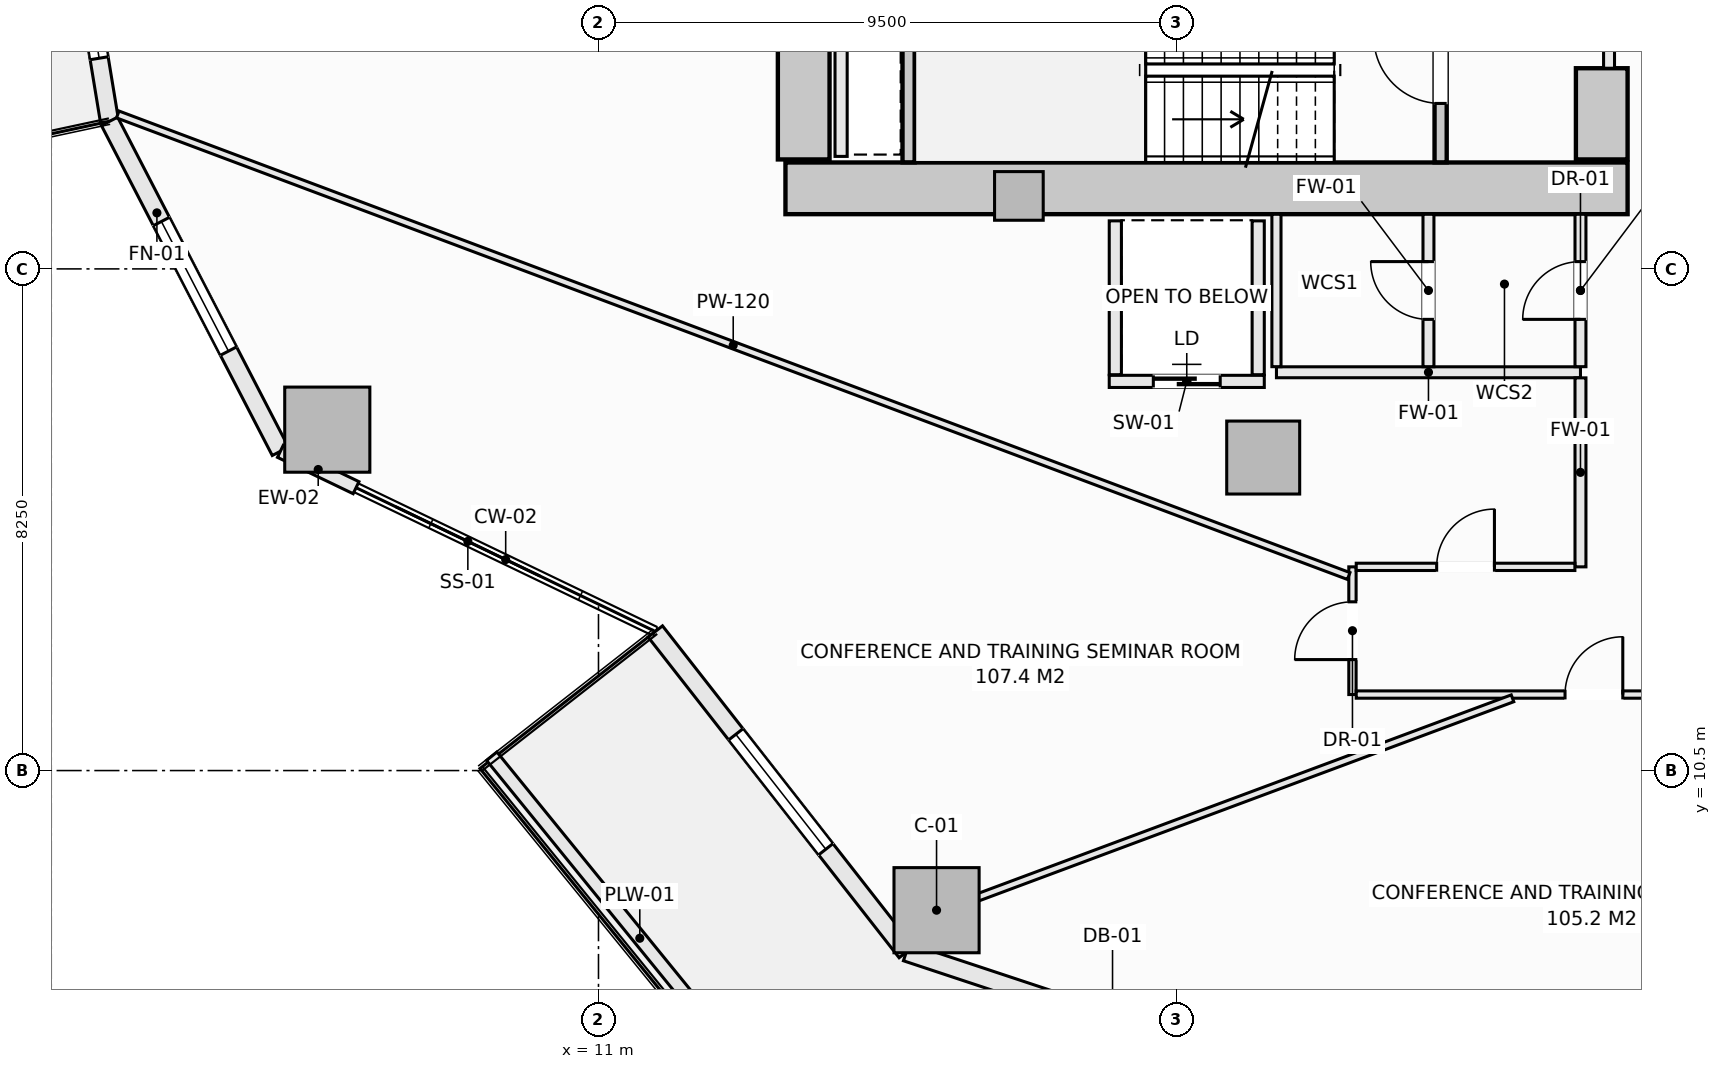
"""IFC4 building model, lengths in metres.
Left out: names, types, materials, properties, quantities, classifications, styles, units other than length and angle.
Written with IfcOpenShell. Run it as: python <this file> out.ifc"""

import sys

from ifc_helpers import new_model, si_unit, direction, frame, frame_2d, origin, origin_2d, place, context, subcontext, project, spatial, rectangle, extrude, element, fill, save


model = new_model("IFC4")
c1 = context("Model", 3, precision=1e-05, world=origin(), true_north=direction((0.0, 1.0)))
c2 = subcontext(c1, "Body", "Model", "MODEL_VIEW")
j1 = project(units=[si_unit("LENGTHUNIT", "METRE"), si_unit("PLANEANGLEUNIT", "RADIAN")], contexts=[c1])
p1 = place(None, origin())
s1 = spatial("IfcSite", under=j1, at=p1, CompositionType="ELEMENT")
p2 = place(p1, origin())
s2 = spatial("IfcBuilding", under=s1, at=p2, CompositionType="ELEMENT")
p3 = place(p2, frame((0.0, 0.0, 38.05)))
s3 = spatial("IfcBuildingStorey", under=s2, at=p3, CompositionType="ELEMENT", Elevation=38.05)
p4 = place(p3, frame((14.075, 20.075, -0.28), z_axis=(0.0, 0.0, 1.0), x_axis=(1.0, 0.0, 0.0)))
e1 = element("IfcWall", 1, at=p4, inside=s3, PredefinedType="SHEAR", context=c2, shape_type="SweptSolid", body=[
    extrude(rectangle(XDim=13.85, YDim=0.85, at=frame_2d((6.925, 0.0))), origin(), (0.0, 0.0, 1.0), 3.85),
])
p5 = place(p3, frame((14.375, 20.55, -0.28), z_axis=(0.0, 0.0, 1.0), x_axis=(0.0, 1.0, 0.0)))
e2 = element("IfcWall", 2, at=p5, inside=s3, PredefinedType="SHEAR", context=c2, shape_type="SweptSolid", body=[
    extrude(rectangle(XDim=12.9, YDim=0.85, at=frame_2d((6.45, 0.0))), origin(), (0.0, 0.0, 1.0), 3.85),
])
p6 = place(p3, frame((27.5, 20.55, -0.28), z_axis=(0.0, 0.0, 1.0), x_axis=(0.0, 1.0, 0.0)))
e3 = element("IfcWall", 3, at=p6, inside=s3, PredefinedType="SHEAR", context=c2, shape_type="SweptSolid", body=[
    extrude(rectangle(XDim=1.5, YDim=0.85, at=frame_2d((0.75, 0.0))), origin(), (0.0, 0.0, 1.0), 3.85),
])
for number, where, z_axis, x_axis in (
    (4, (6.54, 16.106, -0.28), (0.0, 0.0, 1.0), (1.0, 0.0, 0.0)),
    (5, (16.56, 8.204, -0.28), (0.0, 0.0, 1.0), (1.0, 0.0, 0.0)),
):
    element("IfcColumn", number, at=place(p3, frame(where, z_axis=z_axis, x_axis=x_axis)), inside=s3, PredefinedType="COLUMN", context=c2, shape_type="SweptSolid", body=[
        extrude(rectangle(XDim=1.4, YDim=1.4, at=origin_2d()), origin(), (0.0, 0.0, 1.0), 3.85),
    ])
p7 = place(p3, frame((21.932, 15.648, -0.28), z_axis=(0.0, 0.0, 1.0), x_axis=(1.0, 0.0, 0.0)))
e6 = element("IfcColumn", 6, at=p7, inside=s3, PredefinedType="COLUMN", context=c2, shape_type="SweptSolid", body=[
    extrude(rectangle(XDim=1.2, YDim=1.2, at=origin_2d()), origin(), (0.0, 0.0, 1.0), 3.85),
])
p8 = place(p3, frame((17.914, 19.95, -0.28), z_axis=(0.0, 0.0, 1.0), x_axis=(1.0, 0.0, 0.0)))
e7 = element("IfcColumn", 7, at=p8, inside=s3, PredefinedType="PILASTER", context=c2, shape_type="SweptSolid", body=[
    extrude(rectangle(XDim=0.8, YDim=0.8, at=origin_2d()), origin(), (0.0, 0.0, 1.0), 3.85),
])
p9 = place(p3, frame((2.0, 27.0, 0.0), z_axis=(0.0, 0.0, 1.0), x_axis=(0.162366057843, -0.98673059305, 0.0)))
e8 = element("IfcWall", 8, at=p9, inside=s3, PredefinedType="SOLIDWALL", context=c2, shape_type="SweptSolid", body=[
    extrude(rectangle(XDim=5.902, YDim=0.3, at=frame_2d((2.951, 0.0))), origin(), (0.0, 0.0, 1.0), 3.093),
])
p10 = place(p9, frame((2.45, 0.0, 0.85)))
e9 = element("IfcOpeningElement", 9, at=p10, cuts=e8, PredefinedType="OPENING", context=c2, shape_type="SweptSolid", body=[
    extrude(rectangle(XDim=2.4, YDim=1.9, at=frame_2d((1.2, 0.95))), frame((0.0, 0.16, 0.0), z_axis=(0.0, -1.0, 0.0), x_axis=(1.0, 0.0, 0.0)), (0.0, 0.0, 1.0), 0.32),
])
p11 = place(p3, frame((2.958, 21.177, 0.0), z_axis=(0.0, 0.0, 1.0), x_axis=(0.459809804413, -0.88801742312, 0.0)))
e10 = element("IfcWall", 10, at=p11, inside=s3, PredefinedType="SOLIDWALL", context=c2, shape_type="SweptSolid", body=[
    extrude(rectangle(XDim=6.111, YDim=0.3, at=frame_2d((3.055, 0.0))), origin(), (0.0, 0.0, 1.0), 3.093),
])
p12 = place(p11, frame((1.855, 0.0, 0.85)))
e11 = element("IfcOpeningElement", 11, at=p12, cuts=e10, PredefinedType="OPENING", context=c2, shape_type="SweptSolid", body=[
    extrude(rectangle(XDim=2.4, YDim=1.9, at=frame_2d((1.2, 0.95))), frame((0.0, 0.16, 0.0), z_axis=(0.0, -1.0, 0.0), x_axis=(1.0, 0.0, 0.0)), (0.0, 0.0, 1.0), 0.32),
])
p13 = place(p3, frame((5.768, 15.75, 0.0), z_axis=(0.0, 0.0, 1.0), x_axis=(0.90131879969, -0.433156347438, 0.0)))
e12 = element("IfcWall", 12, at=p13, inside=s3, PredefinedType="SOLIDWALL", context=c2, shape_type="SweptSolid", body=[
    extrude(rectangle(XDim=1.381, YDim=0.22, at=frame_2d((0.69, 0.0))), origin(), (0.0, 0.0, 1.0), 3.093),
])
p14 = place(p3, frame((11.935, 12.787, 0.0), z_axis=(0.0, 0.0, 1.0), x_axis=(0.616421309777, -0.787416515482, 0.0)))
e13 = element("IfcWall", 13, at=p14, inside=s3, PredefinedType="SOLIDWALL", context=c2, shape_type="SweptSolid", body=[
    extrude(rectangle(XDim=6.696, YDim=0.3, at=frame_2d((3.348, 0.0))), origin(), (0.0, 0.0, 1.0), 3.093),
])
p15 = place(p14, frame((2.148, 0.0, 0.85)))
e14 = element("IfcOpeningElement", 14, at=p15, cuts=e13, PredefinedType="OPENING", context=c2, shape_type="SweptSolid", body=[
    extrude(rectangle(XDim=2.4, YDim=1.9, at=frame_2d((1.2, 0.95))), frame((0.0, 0.16, 0.0), z_axis=(0.0, -1.0, 0.0), x_axis=(1.0, 0.0, 0.0)), (0.0, 0.0, 1.0), 0.32),
])
p16 = place(p3, frame((16.062, 7.514, 0.0), z_axis=(0.0, 0.0, 1.0), x_axis=(0.949238715533, -0.31455661006, 0.0)))
e15 = element("IfcWall", 15, at=p16, inside=s3, PredefinedType="SOLIDWALL", context=c2, shape_type="SweptSolid", body=[
    extrude(rectangle(XDim=7.146, YDim=0.3, at=frame_2d((3.573, 0.0))), origin(), (0.0, 0.0, 1.0), 3.093),
])
p17 = place(p16, frame((2.673, 0.0, 0.0)))
e16 = element("IfcOpeningElement", 16, at=p17, cuts=e15, PredefinedType="OPENING", context=c2, shape_type="SweptSolid", body=[
    extrude(rectangle(XDim=1.8, YDim=2.25, at=frame_2d((0.9, 1.125))), frame((0.0, 0.16, 0.0), z_axis=(0.0, -1.0, 0.0), x_axis=(1.0, 0.0, 0.0)), (0.0, 0.0, 1.0), 0.32),
])
p18 = place(p3, frame((9.244, 10.736, 0.0), z_axis=(0.0, 0.0, 1.0), x_axis=(0.630997450658, -0.775784903993, 0.0)))
e17 = element("IfcWall", 17, at=p18, inside=s3, PredefinedType="PARAPET", context=c2, shape_type="SweptSolid", body=[
    extrude(rectangle(XDim=7.718, YDim=0.22, at=frame_2d((3.859, 0.0))), origin(), (0.0, 0.0, 1.0), 0.52),
])
p19 = place(p3, frame((24.85, 20.502, -0.28), z_axis=(0.0, 0.0, 1.0), x_axis=(0.0, 1.0, 0.0)))
e18 = element("IfcWall", 18, at=p19, inside=s3, PredefinedType="SHEAR", context=c2, shape_type="SweptSolid", body=[
    extrude(rectangle(XDim=3.038, YDim=0.2, at=frame_2d((1.519, 0.0))), origin(), (0.0, 0.0, 1.0), 3.85),
])
p20 = place(p19, frame((0.969, 0.0, 0.28)))
e19 = element("IfcOpeningElement", 19, at=p20, cuts=e18, PredefinedType="OPENING", context=c2, shape_type="SweptSolid", body=[
    extrude(rectangle(XDim=1.1, YDim=2.15, at=frame_2d((0.55, 1.075))), frame((0.0, 0.11, 0.0), z_axis=(0.0, -1.0, 0.0), x_axis=(1.0, 0.0, 0.0)), (0.0, 0.0, 1.0), 0.22),
])
p21 = place(p3, frame((16.1, 20.502, -0.28), z_axis=(0.0, 0.0, 1.0), x_axis=(0.0, 1.0, 0.0)))
e20 = element("IfcWall", 20, at=p21, inside=s3, PredefinedType="SHEAR", context=c2, shape_type="SweptSolid", body=[
    extrude(rectangle(XDim=3.036, YDim=0.2, at=frame_2d((1.518, 0.0))), origin(), (0.0, 0.0, 1.0), 3.85),
])
p22 = place(p3, frame((19.4, 16.9, 0.0), z_axis=(0.0, 0.0, 1.0), x_axis=(1.0, 0.0, 0.0)))
e21 = element("IfcWall", 21, at=p22, inside=s3, PredefinedType="SOLIDWALL", context=c2, shape_type="SweptSolid", body=[
    extrude(rectangle(XDim=2.55, YDim=0.2, at=frame_2d((1.275, 0.0))), origin(), (0.0, 0.0, 1.0), 3.57),
])
p23 = place(p22, frame((0.725, 0.0, 0.0)))
e22 = element("IfcOpeningElement", 22, at=p23, cuts=e21, PredefinedType="OPENING", context=c2, shape_type="SweptSolid", body=[
    extrude(rectangle(XDim=1.1, YDim=2.2, at=frame_2d((0.55, 1.1))), frame((0.0, 0.11, 0.0), z_axis=(0.0, -1.0, 0.0), x_axis=(1.0, 0.0, 0.0)), (0.0, 0.0, 1.0), 0.22),
])
for number, where, z_axis, x_axis in (
    (23, (19.5, 17.01, 0.0), (0.0, 0.0, 1.0), (0.0, 1.0, 0.0)),
    (24, (21.85, 17.01, 0.0), (0.0, 0.0, 1.0), (0.0, 1.0, 0.0)),
):
    element("IfcWall", number, at=place(p3, frame(where, z_axis=z_axis, x_axis=x_axis)), inside=s3, PredefinedType="SOLIDWALL", context=c2, shape_type="SweptSolid", body=[
        extrude(rectangle(XDim=2.53, YDim=0.2, at=frame_2d((1.265, 0.0))), origin(), (0.0, 0.0, 1.0), 3.57),
    ])
p24 = place(p3, frame((14.99, 20.6, 0.0), z_axis=(0.0, 0.0, 1.0), x_axis=(0.0, 1.0, 0.0)))
e25 = element("IfcWall", 25, at=p24, inside=s3, PredefinedType="SOLIDWALL", context=c2, shape_type="SweptSolid", body=[
    extrude(rectangle(XDim=2.85, YDim=0.2, at=frame_2d((1.425, 0.0))), origin(), (0.0, 0.0, 1.0), 3.57),
])
p25 = place(p3, frame((27.62, 22.05, 0.0), z_axis=(0.0, 0.0, 1.0), x_axis=(0.0, 1.0, 0.0)))
e26 = element("IfcWall", 26, at=p25, inside=s3, PredefinedType="SOLIDWALL", context=c2, shape_type="SweptSolid", body=[
    extrude(rectangle(XDim=9.9, YDim=0.18, at=frame_2d((4.95, 0.0))), origin(), (0.0, 0.0, 1.0), 2.662),
])
p26 = place(p25, frame((4.475, 0.0, 0.0)))
e27 = element("IfcOpeningElement", 27, at=p26, cuts=e26, PredefinedType="OPENING", context=c2, shape_type="SweptSolid", body=[
    extrude(rectangle(XDim=0.95, YDim=2.1, at=frame_2d((0.475, 1.05))), frame((0.0, 0.1, 0.0), z_axis=(0.0, -1.0, 0.0), x_axis=(1.0, 0.0, 0.0)), (0.0, 0.0, 1.0), 0.2),
])
p27 = place(p25, frame((6.89, 0.0, 0.0)))
e28 = element("IfcOpeningElement", 28, at=p27, cuts=e26, PredefinedType="OPENING", context=c2, shape_type="SweptSolid", body=[
    extrude(rectangle(XDim=1.5, YDim=2.2, at=frame_2d((0.75, 1.1))), frame((0.0, 0.1, 0.0), z_axis=(0.0, -1.0, 0.0), x_axis=(1.0, 0.0, 0.0)), (0.0, 0.0, 1.0), 0.2),
])
p28 = place(p25, frame((1.51, 0.0, 0.0)))
e29 = element("IfcOpeningElement", 29, at=p28, cuts=e26, PredefinedType="OPENING", context=c2, shape_type="SweptSolid", body=[
    extrude(rectangle(XDim=1.5, YDim=2.2, at=frame_2d((0.75, 1.1))), frame((0.0, 0.1, 0.0), z_axis=(0.0, -1.0, 0.0), x_axis=(1.0, 0.0, 0.0)), (0.0, 0.0, 1.0), 0.2),
])
p29 = place(p3, frame((22.15, 17.05, 0.0), z_axis=(0.0, 0.0, 1.0), x_axis=(1.0, 0.0, 0.0)))
e30 = element("IfcWall", 30, at=p29, inside=s3, PredefinedType="SOLIDWALL", context=c2, shape_type="SweptSolid", body=[
    extrude(rectangle(XDim=5.0, YDim=0.18, at=frame_2d((2.5, 0.0))), origin(), (0.0, 0.0, 1.0), 3.57),
])
p30 = place(p3, frame((22.15, 17.142, 0.0), z_axis=(0.0, 0.0, 1.0), x_axis=(0.0, 1.0, 0.0)))
e31 = element("IfcWall", 31, at=p30, inside=s3, PredefinedType="PARTITIONING", context=c2, shape_type="SweptSolid", body=[
    extrude(rectangle(XDim=2.506, YDim=0.15, at=frame_2d((1.253, 0.0))), origin(), (0.0, 0.0, 1.0), 3.57),
])
p31 = place(p3, frame((24.65, 17.142, 0.0), z_axis=(0.0, 0.0, 1.0), x_axis=(0.0, 1.0, 0.0)))
e32 = element("IfcWall", 32, at=p31, inside=s3, PredefinedType="SOLIDWALL", context=c2, shape_type="SweptSolid", body=[
    extrude(rectangle(XDim=2.506, YDim=0.18, at=frame_2d((1.253, 0.0))), origin(), (0.0, 0.0, 1.0), 3.57),
])
p32 = place(p31, frame((0.778, 0.0, 0.0)))
e33 = element("IfcOpeningElement", 33, at=p32, cuts=e32, PredefinedType="OPENING", context=c2, shape_type="SweptSolid", body=[
    extrude(rectangle(XDim=0.95, YDim=2.1, at=frame_2d((0.475, 1.05))), frame((0.0, 0.1, 0.0), z_axis=(0.0, -1.0, 0.0), x_axis=(1.0, 0.0, 0.0)), (0.0, 0.0, 1.0), 0.2),
])
p33 = place(p3, frame((27.15, 13.85, 0.0), z_axis=(0.0, 0.0, 1.0), x_axis=(0.0, 1.0, 0.0)))
e34 = element("IfcWall", 34, at=p33, inside=s3, PredefinedType="SOLIDWALL", context=c2, shape_type="SweptSolid", body=[
    extrude(rectangle(XDim=3.108, YDim=0.18, at=frame_2d((1.554, 0.0))), origin(), (0.0, 0.0, 1.0), 3.57),
])
p34 = place(p3, frame((27.15, 17.142, 0.0), z_axis=(0.0, 0.0, 1.0), x_axis=(0.0, 1.0, 0.0)))
e35 = element("IfcWall", 35, at=p34, inside=s3, PredefinedType="SOLIDWALL", context=c2, shape_type="SweptSolid", body=[
    extrude(rectangle(XDim=2.506, YDim=0.18, at=frame_2d((1.253, 0.0))), origin(), (0.0, 0.0, 1.0), 3.57),
])
p35 = place(p34, frame((0.778, 0.0, 0.0)))
e36 = element("IfcOpeningElement", 36, at=p35, cuts=e35, PredefinedType="OPENING", context=c2, shape_type="SweptSolid", body=[
    extrude(rectangle(XDim=0.95, YDim=2.1, at=frame_2d((0.475, 1.05))), frame((0.0, 0.1, 0.0), z_axis=(0.0, -1.0, 0.0), x_axis=(1.0, 0.0, 0.0)), (0.0, 0.0, 1.0), 0.2),
])
p36 = place(p3, frame((23.4, 11.75, 0.0), z_axis=(0.0, 0.0, 1.0), x_axis=(0.0, 1.0, 0.0)))
e37 = element("IfcWall", 37, at=p36, inside=s3, PredefinedType="PARTITIONING", context=c2, shape_type="SweptSolid", body=[
    extrude(rectangle(XDim=2.1, YDim=0.12, at=frame_2d((1.05, 0.0))), origin(), (0.0, 0.0, 1.0), 3.57),
])
p37 = place(p36, frame((0.575, 0.0, 0.0)))
e38 = element("IfcOpeningElement", 38, at=p37, cuts=e37, PredefinedType="OPENING", context=c2, shape_type="SweptSolid", body=[
    extrude(rectangle(XDim=0.95, YDim=2.1, at=frame_2d((0.475, 1.05))), frame((0.0, 0.07, 0.0), z_axis=(0.0, -1.0, 0.0), x_axis=(1.0, 0.0, 0.0)), (0.0, 0.0, 1.0), 0.14),
])
p38 = place(p3, frame((23.462, 11.75, 0.0), z_axis=(0.0, 0.0, 1.0), x_axis=(1.0, 0.0, 0.0)))
e39 = element("IfcWall", 39, at=p38, inside=s3, PredefinedType="PARTITIONING", context=c2, shape_type="SweptSolid", body=[
    extrude(rectangle(XDim=19.495, YDim=0.12, at=frame_2d((9.748, 0.0))), origin(), (0.0, 0.0, 1.0), 3.57),
])
p39 = place(p38, frame((3.434, 0.0, 0.0)))
e40 = element("IfcOpeningElement", 40, at=p39, cuts=e39, PredefinedType="OPENING", context=c2, shape_type="SweptSolid", body=[
    extrude(rectangle(XDim=0.95, YDim=2.1, at=frame_2d((0.475, 1.05))), frame((0.0, 0.07, 0.0), z_axis=(0.0, -1.0, 0.0), x_axis=(1.0, 0.0, 0.0)), (0.0, 0.0, 1.0), 0.14),
])
p40 = place(p38, frame((11.388, 0.0, 0.0)))
e41 = element("IfcOpeningElement", 41, at=p40, cuts=e39, PredefinedType="OPENING", context=c2, shape_type="SweptSolid", body=[
    extrude(rectangle(XDim=0.95, YDim=2.1, at=frame_2d((0.475, 1.05))), frame((0.0, 0.07, 0.0), z_axis=(0.0, -1.0, 0.0), x_axis=(1.0, 0.0, 0.0)), (0.0, 0.0, 1.0), 0.14),
])
p41 = place(p3, frame((23.462, 13.85, 0.0), z_axis=(0.0, 0.0, 1.0), x_axis=(1.0, 0.0, 0.0)))
e42 = element("IfcWall", 42, at=p41, inside=s3, PredefinedType="PARTITIONING", context=c2, shape_type="SweptSolid", body=[
    extrude(rectangle(XDim=3.596, YDim=0.12, at=frame_2d((1.798, 0.0))), origin(), (0.0, 0.0, 1.0), 3.57),
])
p42 = place(p41, frame((1.323, 0.0, 0.0)))
e43 = element("IfcOpeningElement", 43, at=p42, cuts=e42, PredefinedType="OPENING", context=c2, shape_type="SweptSolid", body=[
    extrude(rectangle(XDim=0.95, YDim=2.1, at=frame_2d((0.475, 1.05))), frame((0.0, 0.07, 0.0), z_axis=(0.0, -1.0, 0.0), x_axis=(1.0, 0.0, 0.0)), (0.0, 0.0, 1.0), 0.14),
])
p43 = place(p3, frame((3.094, 21.29, 0.0), z_axis=(0.0, 0.0, 1.0), x_axis=(0.936344026666, -0.35108384145, 0.0)))
e44 = element("IfcWall", 44, at=p43, inside=s3, PredefinedType="PARTITIONING", context=c2, shape_type="SweptSolid", body=[
    extrude(rectangle(XDim=21.62, YDim=0.12, at=frame_2d((10.81, 0.0))), origin(), (0.0, 0.0, 1.0), 3.57),
])
p44 = place(p3, frame((15.932, 7.927, 0.0), z_axis=(0.0, 0.0, 1.0), x_axis=(0.937141242974, 0.348950269689, 0.0)))
e45 = element("IfcWall", 45, at=p44, inside=s3, PredefinedType="PARTITIONING", context=c2, shape_type="SweptSolid", body=[
    extrude(rectangle(XDim=10.777, YDim=0.12, at=frame_2d((5.389, 0.0))), origin(), (0.0, 0.0, 1.0), 2.934),
])
p45 = place(p10, origin())
e46 = element("IfcWindow", 46, at=p45, inside=s3, PartitioningType="SINGLE_PANEL", PredefinedType="WINDOW", context=c2, shape_type="SweptSolid", body=[
    extrude(rectangle(XDim=2.4, YDim=1.9, at=frame_2d((1.2, 0.95))), frame((0.0, 0.03, 0.0), z_axis=(0.0, -1.0, 0.0), x_axis=(1.0, 0.0, 0.0)), (0.0, 0.0, 1.0), 0.06),
])
fill(e9, e46)
p46 = place(p12, origin())
e47 = element("IfcWindow", 47, at=p46, inside=s3, PartitioningType="SINGLE_PANEL", PredefinedType="WINDOW", context=c2, shape_type="SweptSolid", body=[
    extrude(rectangle(XDim=2.4, YDim=1.9, at=frame_2d((1.2, 0.95))), frame((0.0, 0.03, 0.0), z_axis=(0.0, -1.0, 0.0), x_axis=(1.0, 0.0, 0.0)), (0.0, 0.0, 1.0), 0.06),
])
fill(e11, e47)
p47 = place(p15, origin())
e48 = element("IfcWindow", 48, at=p47, inside=s3, PartitioningType="SINGLE_PANEL", PredefinedType="WINDOW", context=c2, shape_type="SweptSolid", body=[
    extrude(rectangle(XDim=2.4, YDim=1.9, at=frame_2d((1.2, 0.95))), frame((0.0, 0.03, 0.0), z_axis=(0.0, -1.0, 0.0), x_axis=(1.0, 0.0, 0.0)), (0.0, 0.0, 1.0), 0.06),
])
fill(e14, e48)
p48 = place(p20, origin())
e49 = element("IfcDoor", 49, at=p48, inside=s3, OperationType="SINGLE_SWING_RIGHT", PredefinedType="DOOR", context=c2, shape_type="SweptSolid", body=[
    extrude(rectangle(XDim=1.1, YDim=2.15, at=frame_2d((0.55, 1.075))), frame((0.0, 0.025, 0.0), z_axis=(0.0, -1.0, 0.0), x_axis=(1.0, 0.0, 0.0)), (0.0, 0.0, 1.0), 0.05),
])
fill(e19, e49)
p49 = place(p23, origin())
e50 = element("IfcDoor", 50, at=p49, inside=s3, OperationType="SLIDING_TO_LEFT", PredefinedType="DOOR", context=c2, shape_type="SweptSolid", body=[
    extrude(rectangle(XDim=1.1, YDim=2.2, at=frame_2d((0.55, 1.1))), frame((0.0, 0.025, 0.0), z_axis=(0.0, -1.0, 0.0), x_axis=(1.0, 0.0, 0.0)), (0.0, 0.0, 1.0), 0.05),
])
fill(e22, e50)
p50 = place(p35, origin())
e51 = element("IfcDoor", 51, at=p50, inside=s3, OperationType="SINGLE_SWING_LEFT", PredefinedType="DOOR", context=c2, shape_type="SweptSolid", body=[
    extrude(rectangle(XDim=0.95, YDim=2.1, at=frame_2d((0.475, 1.05))), frame((0.0, 0.025, 0.0), z_axis=(0.0, -1.0, 0.0), x_axis=(1.0, 0.0, 0.0)), (0.0, 0.0, 1.0), 0.05),
])
fill(e36, e51)
p51 = place(p42, origin())
e52 = element("IfcDoor", 52, at=p51, inside=s3, OperationType="SINGLE_SWING_RIGHT", PredefinedType="DOOR", context=c2, shape_type="SweptSolid", body=[
    extrude(rectangle(XDim=0.95, YDim=2.1, at=frame_2d((0.475, 1.05))), frame((0.0, 0.025, 0.0), z_axis=(0.0, -1.0, 0.0), x_axis=(1.0, 0.0, 0.0)), (0.0, 0.0, 1.0), 0.05),
])
fill(e43, e52)
p52 = place(p37, origin())
e53 = element("IfcDoor", 53, at=p52, inside=s3, OperationType="SINGLE_SWING_LEFT", PredefinedType="DOOR", context=c2, shape_type="SweptSolid", body=[
    extrude(rectangle(XDim=0.95, YDim=2.1, at=frame_2d((0.475, 1.05))), frame((0.0, 0.025, 0.0), z_axis=(0.0, -1.0, 0.0), x_axis=(1.0, 0.0, 0.0)), (0.0, 0.0, 1.0), 0.05),
])
fill(e38, e53)
p53 = place(p39, origin())
e54 = element("IfcDoor", 54, at=p53, inside=s3, OperationType="SINGLE_SWING_RIGHT", PredefinedType="DOOR", context=c2, shape_type="SweptSolid", body=[
    extrude(rectangle(XDim=0.95, YDim=2.1, at=frame_2d((0.475, 1.05))), frame((0.0, 0.025, 0.0), z_axis=(0.0, -1.0, 0.0), x_axis=(1.0, 0.0, 0.0)), (0.0, 0.0, 1.0), 0.05),
])
fill(e40, e54)
p54 = place(p32, origin())
e55 = element("IfcDoor", 55, at=p54, inside=s3, OperationType="SINGLE_SWING_RIGHT", PredefinedType="DOOR", context=c2, shape_type="SweptSolid", body=[
    extrude(rectangle(XDim=0.95, YDim=2.1, at=frame_2d((0.475, 1.05))), frame((0.0, 0.025, 0.0), z_axis=(0.0, -1.0, 0.0), x_axis=(1.0, 0.0, 0.0)), (0.0, 0.0, 1.0), 0.05),
])
fill(e33, e55)
save(model, sys.argv[1])
